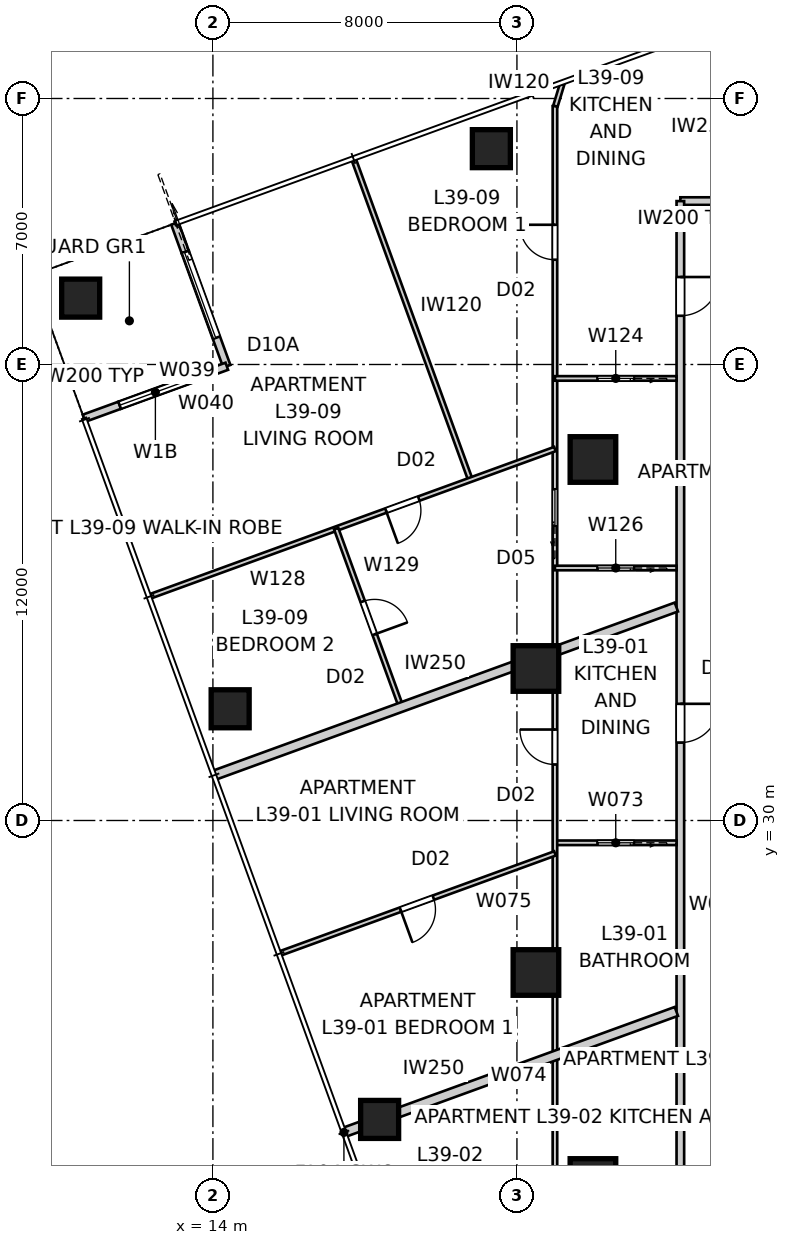
"""IFC4 building model, lengths in metres.
Left out: names, types, materials, properties, quantities, classifications, styles, units other than length and angle.
Written with IfcOpenShell. Run it as: python <this file> out.ifc"""

import sys

from ifc_helpers import new_model, si_unit, direction, frame, frame_2d, origin, origin_2d, place, context, subcontext, project, spatial, rectangle, extrude, element, fill, save


model = new_model("IFC4")
c1 = context("Model", 3, precision=1e-05, world=origin(), true_north=direction((0.0, 1.0)))
c2 = subcontext(c1, "Body", "Model", "MODEL_VIEW")
j1 = project(units=[si_unit("LENGTHUNIT", "METRE"), si_unit("PLANEANGLEUNIT", "RADIAN")], contexts=[c1])
p1 = place(None, origin())
s1 = spatial("IfcSite", under=j1, at=p1, CompositionType="ELEMENT")
p2 = place(p1, origin())
s2 = spatial("IfcBuilding", under=s1, at=p2, CompositionType="ELEMENT")
p3 = place(p2, frame((0.0, 0.0, 143.8)))
s3 = spatial("IfcBuildingStorey", under=s2, at=p3, CompositionType="ELEMENT", Elevation=143.8)
for number, where, z_axis, x_axis in (
    (1, (21.327, 47.68, -0.15), (0.0, 0.0, 1.0), (1.0, 0.0, 0.0)),
    (2, (10.521, 43.747, -0.15), (0.0, 0.0, 1.0), (1.0, 0.0, 0.0)),
    (3, (14.454, 32.94, -0.15), (0.0, 0.0, 1.0), (1.0, 0.0, 0.0)),
    (4, (18.387, 22.134, -0.15), (0.0, 0.0, 1.0), (1.0, 0.0, 0.0)),
):
    element("IfcColumn", number, at=place(p3, frame(where, z_axis=z_axis, x_axis=x_axis)), inside=s3, PredefinedType="COLUMN", context=c2, shape_type="SweptSolid", body=[
        extrude(rectangle(XDim=1.0, YDim=1.0, at=origin_2d()), origin(), (0.0, 0.0, 1.0), 3.55),
    ])
for number, where, z_axis, x_axis in (
    (5, (24.0, 39.5, 0.0), (0.0, 0.0, 1.0), (1.0, 0.0, 0.0)),
    (6, (22.5, 34.0, 0.0), (0.0, 0.0, 1.0), (1.0, 0.0, 0.0)),
    (7, (22.5, 26.0, 0.0), (0.0, 0.0, 1.0), (1.0, 0.0, 0.0)),
    (8, (24.0, 20.5, 0.0), (0.0, 0.0, 1.0), (1.0, 0.0, 0.0)),
):
    element("IfcColumn", number, at=place(p3, frame(where, z_axis=z_axis, x_axis=x_axis)), inside=s3, PredefinedType="COLUMN", context=c2, shape_type="SweptSolid", body=[
        extrude(rectangle(XDim=1.2, YDim=1.2, at=origin_2d()), origin(), (0.0, 0.0, 1.0), 3.4),
    ])
p4 = place(p3, frame((12.998, 45.712, 0.0), z_axis=(0.0, 0.0, 1.0), x_axis=(0.342110593602, -0.939659694648, 0.0)))
e9 = element("IfcWall", 9, at=p4, inside=s3, PredefinedType="SOLIDWALL", context=c2, shape_type="SweptSolid", body=[
    extrude(rectangle(XDim=0.8, YDim=0.2, at=frame_2d((0.4, 0.0))), origin(), (0.0, 0.0, 1.0), 3.25),
])
p5 = place(p3, frame((13.271, 44.96, 0.0), z_axis=(0.0, 0.0, 1.0), x_axis=(0.342018703306, -0.939693144909, 0.0)))
e10 = element("IfcWall", 10, at=p5, inside=s3, PredefinedType="SOLIDWALL", context=c2, shape_type="SweptSolid", body=[
    extrude(rectangle(XDim=3.2, YDim=0.2, at=frame_2d((1.6, 0.0))), origin(), (0.0, 0.0, 1.0), 2.722),
])
p6 = place(p5, origin())
e11 = element("IfcOpeningElement", 11, at=p6, cuts=e10, PredefinedType="OPENING", context=c2, shape_type="SweptSolid", body=[
    extrude(rectangle(XDim=2.4, YDim=2.1, at=frame_2d((1.2, 1.05))), frame((0.0, 0.11, 0.0), z_axis=(0.0, -1.0, 0.0), x_axis=(1.0, 0.0, 0.0)), (0.0, 0.0, 1.0), 0.22),
])
p7 = place(p3, frame((14.366, 41.953, 0.0), z_axis=(0.0, 0.0, 1.0), x_axis=(-0.939712609717, -0.341965219194, 0.0)))
e12 = element("IfcWall", 12, at=p7, inside=s3, PredefinedType="SOLIDWALL", context=c2, shape_type="SweptSolid", body=[
    extrude(rectangle(XDim=3.0, YDim=0.2, at=frame_2d((1.5, 0.0))), origin(), (0.0, 0.0, 1.0), 2.722),
])
p8 = place(p7, frame((1.0, 0.0, 0.45)))
e13 = element("IfcOpeningElement", 13, at=p8, cuts=e12, PredefinedType="OPENING", context=c2, shape_type="SweptSolid", body=[
    extrude(rectangle(XDim=2.0, YDim=1.8, at=frame_2d((1.0, 0.9))), frame((0.0, 0.11, 0.0), z_axis=(0.0, -1.0, 0.0), x_axis=(1.0, 0.0, 0.0)), (0.0, 0.0, 1.0), 0.22),
])
p9 = place(p3, frame((11.547, 40.927, 0.0), z_axis=(0.0, 0.0, 1.0), x_axis=(-0.939686455819, -0.342037080957, 0.0)))
e14 = element("IfcWall", 14, at=p9, inside=s3, PredefinedType="SOLIDWALL", context=c2, shape_type="SweptSolid", body=[
    extrude(rectangle(XDim=1.0, YDim=0.2, at=frame_2d((0.5, 0.0))), origin(), (0.0, 0.0, 1.0), 3.25),
])
p10 = place(p3, frame((30.758, 46.3, 0.0), z_axis=(0.0, 0.0, 1.0), x_axis=(-1.0, 0.0, 0.0)))
e15 = element("IfcWall", 15, at=p10, inside=s3, PredefinedType="PARTITIONING", context=c2, shape_type="SweptSolid", body=[
    extrude(rectangle(XDim=4.458, YDim=0.2, at=frame_2d((2.229, 0.0))), origin(), (0.0, 0.0, 1.0), 3.25),
])
p11 = place(p3, frame((26.3, 46.3, 0.0), z_axis=(0.0, 0.0, 1.0), x_axis=(0.0, -1.0, 0.0)))
e16 = element("IfcWall", 16, at=p11, inside=s3, PredefinedType="PARTITIONING", context=c2, shape_type="SweptSolid", body=[
    extrude(rectangle(XDim=33.0, YDim=0.2, at=frame_2d((16.5, 0.0))), origin(), (0.0, 0.0, 1.0), 3.25),
])
p12 = place(p11, frame((13.229, 0.0, 0.0)))
e17 = element("IfcOpeningElement", 17, at=p12, cuts=e16, PredefinedType="OPENING", context=c2, shape_type="SweptSolid", body=[
    extrude(rectangle(XDim=1.02, YDim=2.34, at=frame_2d((0.51, 1.17))), frame((0.0, 0.11, 0.0), z_axis=(0.0, -1.0, 0.0), x_axis=(1.0, 0.0, 0.0)), (0.0, 0.0, 1.0), 0.22),
])
p13 = place(p11, frame((28.51, 0.0, 0.0)))
e18 = element("IfcOpeningElement", 18, at=p13, cuts=e16, PredefinedType="OPENING", context=c2, shape_type="SweptSolid", body=[
    extrude(rectangle(XDim=1.02, YDim=2.34, at=frame_2d((0.51, 1.17))), frame((0.0, 0.11, 0.0), z_axis=(0.0, -1.0, 0.0), x_axis=(1.0, 0.0, 0.0)), (0.0, 0.0, 1.0), 0.22),
])
p14 = place(p11, frame((1.998, 0.0, 0.0)))
e19 = element("IfcOpeningElement", 19, at=p14, cuts=e16, PredefinedType="OPENING", context=c2, shape_type="SweptSolid", body=[
    extrude(rectangle(XDim=1.02, YDim=2.34, at=frame_2d((0.51, 1.17))), frame((0.0, 0.11, 0.0), z_axis=(0.0, -1.0, 0.0), x_axis=(1.0, 0.0, 0.0)), (0.0, 0.0, 1.0), 0.22),
])
p15 = place(p3, frame((14.027, 31.188, 0.0), z_axis=(0.0, 0.0, 1.0), x_axis=(0.939692090592, 0.342021600019, 0.0)))
e20 = element("IfcWall", 20, at=p15, inside=s3, PredefinedType="PARTITIONING", context=c2, shape_type="SweptSolid", body=[
    extrude(rectangle(XDim=12.949, YDim=0.25, at=frame_2d((6.474, 0.0))), origin(), (0.0, 0.0, 1.0), 3.25),
])
p16 = place(p3, frame((17.447, 21.792, 0.0), z_axis=(0.0, 0.0, 1.0), x_axis=(0.939693071685, 0.342018904489, 0.0)))
e21 = element("IfcWall", 21, at=p16, inside=s3, PredefinedType="PARTITIONING", context=c2, shape_type="SweptSolid", body=[
    extrude(rectangle(XDim=9.309, YDim=0.25, at=frame_2d((4.654, 0.0))), origin(), (0.0, 0.0, 1.0), 3.25),
])
p17 = place(p3, frame((27.093, 50.843, 0.0), z_axis=(0.0, 0.0, 1.0), x_axis=(0.342012883883, -0.939695262975, 0.0)))
e22 = element("IfcWall", 22, at=p17, inside=s3, PredefinedType="PARTITIONING", context=c2, shape_type="SweptSolid", body=[
    extrude(rectangle(XDim=4.722, YDim=0.25, at=frame_2d((2.361, 0.0))), origin(), (0.0, 0.0, 1.0), 3.25),
])
p18 = place(p3, frame((26.2, 29.413, 0.0), z_axis=(0.0, 0.0, 1.0), x_axis=(-1.0, 0.0, 0.0)))
e23 = element("IfcWall", 23, at=p18, inside=s3, PredefinedType="PARTITIONING", context=c2, shape_type="SweptSolid", body=[
    extrude(rectangle(XDim=3.2, YDim=0.12, at=frame_2d((1.6, 0.0))), origin(), (0.0, 0.0, 1.0), 3.25),
])
p19 = place(p18, frame((1.12, 0.0, 0.0)))
e24 = element("IfcOpeningElement", 24, at=p19, cuts=e23, PredefinedType="OPENING", context=c2, shape_type="SweptSolid", body=[
    extrude(rectangle(XDim=0.96, YDim=2.1, at=frame_2d((0.48, 1.05))), frame((0.0, 0.07, 0.0), z_axis=(0.0, -1.0, 0.0), x_axis=(1.0, 0.0, 0.0)), (0.0, 0.0, 1.0), 0.14),
])
p20 = place(p3, frame((23.0, 10.8, 0.0), z_axis=(0.0, 0.0, 1.0), x_axis=(0.0, 1.0, 0.0)))
e25 = element("IfcWall", 25, at=p20, inside=s3, PredefinedType="PARTITIONING", context=c2, shape_type="SweptSolid", body=[
    extrude(rectangle(XDim=38.0, YDim=0.12, at=frame_2d((19.0, 0.0))), origin(), (0.0, 0.0, 1.0), 2.55),
])
p21 = place(p20, frame((20.674, 0.0, 0.0)))
e26 = element("IfcOpeningElement", 26, at=p21, cuts=e25, PredefinedType="OPENING", context=c2, shape_type="SweptSolid", body=[
    extrude(rectangle(XDim=0.92, YDim=2.34, at=frame_2d((0.46, 1.17))), frame((0.0, 0.07, 0.0), z_axis=(0.0, -1.0, 0.0), x_axis=(1.0, 0.0, 0.0)), (0.0, 0.0, 1.0), 0.14),
])
p22 = place(p20, frame((4.598, 0.0, 0.0)))
e27 = element("IfcOpeningElement", 27, at=p22, cuts=e25, PredefinedType="OPENING", context=c2, shape_type="SweptSolid", body=[
    extrude(rectangle(XDim=0.92, YDim=2.34, at=frame_2d((0.46, 1.17))), frame((0.0, 0.07, 0.0), z_axis=(0.0, -1.0, 0.0), x_axis=(1.0, 0.0, 0.0)), (0.0, 0.0, 1.0), 0.14),
])
p23 = place(p20, frame((8.043, 0.0, 0.0)))
e28 = element("IfcOpeningElement", 28, at=p23, cuts=e25, PredefinedType="OPENING", context=c2, shape_type="SweptSolid", body=[
    extrude(rectangle(XDim=0.92, YDim=2.34, at=frame_2d((0.46, 1.17))), frame((0.0, 0.07, 0.0), z_axis=(0.0, -1.0, 0.0), x_axis=(1.0, 0.0, 0.0)), (0.0, 0.0, 1.0), 0.14),
])
p24 = place(p20, frame((33.957, 0.0, 0.0)))
e29 = element("IfcOpeningElement", 29, at=p24, cuts=e25, PredefinedType="OPENING", context=c2, shape_type="SweptSolid", body=[
    extrude(rectangle(XDim=0.92, YDim=2.34, at=frame_2d((0.46, 1.17))), frame((0.0, 0.07, 0.0), z_axis=(0.0, -1.0, 0.0), x_axis=(1.0, 0.0, 0.0)), (0.0, 0.0, 1.0), 0.14),
])
p25 = place(p20, frame((26.957, 0.0, 0.0)))
e30 = element("IfcOpeningElement", 30, at=p25, cuts=e25, PredefinedType="OPENING", context=c2, shape_type="SweptSolid", body=[
    extrude(rectangle(XDim=0.96, YDim=2.1, at=frame_2d((0.48, 1.05))), frame((0.0, 0.07, 0.0), z_axis=(0.0, -1.0, 0.0), x_axis=(1.0, 0.0, 0.0)), (0.0, 0.0, 1.0), 0.14),
])
p26 = place(p3, frame((23.0, 29.134, 0.0), z_axis=(0.0, 0.0, 1.0), x_axis=(-0.939685835373, -0.342038785519, 0.0)))
e31 = element("IfcWall", 31, at=p26, inside=s3, PredefinedType="PARTITIONING", context=c2, shape_type="SweptSolid", body=[
    extrude(rectangle(XDim=7.689, YDim=0.12, at=frame_2d((3.844, 0.0))), origin(), (0.0, 0.0, 1.0), 3.25),
])
p27 = place(p26, frame((3.404, 0.0, 0.0)))
e32 = element("IfcOpeningElement", 32, at=p27, cuts=e31, PredefinedType="OPENING", context=c2, shape_type="SweptSolid", body=[
    extrude(rectangle(XDim=0.92, YDim=2.34, at=frame_2d((0.46, 1.17))), frame((0.0, 0.07, 0.0), z_axis=(0.0, -1.0, 0.0), x_axis=(1.0, 0.0, 0.0)), (0.0, 0.0, 1.0), 0.14),
])
p28 = place(p3, frame((26.2, 41.634, 0.0), z_axis=(0.0, 0.0, 1.0), x_axis=(-1.0, 0.0, 0.0)))
e33 = element("IfcWall", 33, at=p28, inside=s3, PredefinedType="PARTITIONING", context=c2, shape_type="SweptSolid", body=[
    extrude(rectangle(XDim=3.2, YDim=0.12, at=frame_2d((1.6, 0.0))), origin(), (0.0, 0.0, 1.0), 3.25),
])
p29 = place(p28, frame((1.12, 0.0, 0.0)))
e34 = element("IfcOpeningElement", 34, at=p29, cuts=e33, PredefinedType="OPENING", context=c2, shape_type="SweptSolid", body=[
    extrude(rectangle(XDim=0.96, YDim=2.1, at=frame_2d((0.48, 1.05))), frame((0.0, 0.07, 0.0), z_axis=(0.0, -1.0, 0.0), x_axis=(1.0, 0.0, 0.0)), (0.0, 0.0, 1.0), 0.14),
])
p30 = place(p3, frame((23.013, 48.8, 0.0), z_axis=(0.0, 0.0, 1.0), x_axis=(0.290455219909, 0.956888585588, 0.0)))
e35 = element("IfcWall", 35, at=p30, inside=s3, PredefinedType="PARTITIONING", context=c2, shape_type="SweptSolid", body=[
    extrude(rectangle(XDim=0.605, YDim=0.12, at=frame_2d((0.303, 0.0))), origin(), (0.0, 0.0, 1.0), 3.25),
])
p31 = place(p3, frame((26.2, 36.645, 0.0), z_axis=(0.0, 0.0, 1.0), x_axis=(-1.0, 0.0, 0.0)))
e36 = element("IfcWall", 36, at=p31, inside=s3, PredefinedType="PARTITIONING", context=c2, shape_type="SweptSolid", body=[
    extrude(rectangle(XDim=3.2, YDim=0.12, at=frame_2d((1.6, 0.0))), origin(), (0.0, 0.0, 1.0), 3.25),
])
p32 = place(p31, frame((1.12, 0.0, 0.0)))
e37 = element("IfcOpeningElement", 37, at=p32, cuts=e36, PredefinedType="OPENING", context=c2, shape_type="SweptSolid", body=[
    extrude(rectangle(XDim=0.96, YDim=2.1, at=frame_2d((0.48, 1.05))), frame((0.0, 0.07, 0.0), z_axis=(0.0, -1.0, 0.0), x_axis=(1.0, 0.0, 0.0)), (0.0, 0.0, 1.0), 0.14),
])
p33 = place(p3, frame((17.71, 47.385, 0.0), z_axis=(0.0, 0.0, 1.0), x_axis=(0.342038393654, -0.939685978009, 0.0)))
e38 = element("IfcWall", 38, at=p33, inside=s3, PredefinedType="PARTITIONING", context=c2, shape_type="SweptSolid", body=[
    extrude(rectangle(XDim=8.96, YDim=0.12, at=frame_2d((4.48, 0.0))), origin(), (0.0, 0.0, 1.0), 3.25),
])
p34 = place(p3, frame((23.0, 39.775, 0.0), z_axis=(0.0, 0.0, 1.0), x_axis=(-0.939693965364, -0.342016449105, 0.0)))
e39 = element("IfcWall", 39, at=p34, inside=s3, PredefinedType="PARTITIONING", context=c2, shape_type="SweptSolid", body=[
    extrude(rectangle(XDim=11.328, YDim=0.12, at=frame_2d((5.664, 0.0))), origin(), (0.0, 0.0, 1.0), 3.25),
])
p35 = place(p34, frame((3.812, 0.0, 0.0)))
e40 = element("IfcOpeningElement", 40, at=p35, cuts=e39, PredefinedType="OPENING", context=c2, shape_type="SweptSolid", body=[
    extrude(rectangle(XDim=0.92, YDim=2.34, at=frame_2d((0.46, 1.17))), frame((0.0, 0.07, 0.0), z_axis=(0.0, -1.0, 0.0), x_axis=(1.0, 0.0, 0.0)), (0.0, 0.0, 1.0), 0.14),
])
p36 = place(p3, frame((17.243, 37.68, 0.0), z_axis=(0.0, 0.0, 1.0), x_axis=(0.341993964619, -0.939702148643, 0.0)))
e41 = element("IfcWall", 41, at=p36, inside=s3, PredefinedType="PARTITIONING", context=c2, shape_type="SweptSolid", body=[
    extrude(rectangle(XDim=5.0, YDim=0.12, at=frame_2d((2.5, 0.0))), origin(), (0.0, 0.0, 1.0), 3.25),
])
p37 = place(p36, frame((2.04, 0.0, 0.0)))
e42 = element("IfcOpeningElement", 42, at=p37, cuts=e41, PredefinedType="OPENING", context=c2, shape_type="SweptSolid", body=[
    extrude(rectangle(XDim=0.92, YDim=2.34, at=frame_2d((0.46, 1.17))), frame((0.0, 0.07, 0.0), z_axis=(0.0, -1.0, 0.0), x_axis=(1.0, 0.0, 0.0)), (0.0, 0.0, 1.0), 0.14),
])
p38 = place(p6, origin())
e43 = element("IfcDoor", 43, at=p38, inside=s3, OperationType="SLIDING_TO_LEFT", PredefinedType="DOOR", context=c2, shape_type="SweptSolid", body=[
    extrude(rectangle(XDim=2.4, YDim=2.1, at=frame_2d((1.2, 1.05))), frame((0.0, 0.025, 0.0), z_axis=(0.0, -1.0, 0.0), x_axis=(1.0, 0.0, 0.0)), (0.0, 0.0, 1.0), 0.05),
])
fill(e11, e43)
p39 = place(p8, origin())
e44 = element("IfcWindow", 44, at=p39, inside=s3, PartitioningType="SINGLE_PANEL", PredefinedType="WINDOW", context=c2, shape_type="SweptSolid", body=[
    extrude(rectangle(XDim=2.0, YDim=1.8, at=frame_2d((1.0, 0.9))), frame((0.0, 0.03, 0.0), z_axis=(0.0, -1.0, 0.0), x_axis=(1.0, 0.0, 0.0)), (0.0, 0.0, 1.0), 0.06),
])
fill(e13, e44)
p40 = place(p12, origin())
e45 = element("IfcDoor", 45, at=p40, inside=s3, OperationType="SINGLE_SWING_LEFT", PredefinedType="DOOR", context=c2, shape_type="SweptSolid", body=[
    extrude(rectangle(XDim=1.02, YDim=2.34, at=frame_2d((0.51, 1.17))), frame((0.0, 0.025, 0.0), z_axis=(0.0, -1.0, 0.0), x_axis=(1.0, 0.0, 0.0)), (0.0, 0.0, 1.0), 0.05),
])
fill(e17, e45)
p41 = place(p14, origin())
e46 = element("IfcDoor", 46, at=p41, inside=s3, OperationType="SINGLE_SWING_LEFT", PredefinedType="DOOR", context=c2, shape_type="SweptSolid", body=[
    extrude(rectangle(XDim=1.02, YDim=2.34, at=frame_2d((0.51, 1.17))), frame((0.0, 0.025, 0.0), z_axis=(0.0, -1.0, 0.0), x_axis=(1.0, 0.0, 0.0)), (0.0, 0.0, 1.0), 0.05),
])
fill(e19, e46)
p42 = place(p21, origin())
e47 = element("IfcDoor", 47, at=p42, inside=s3, OperationType="SINGLE_SWING_RIGHT", PredefinedType="DOOR", context=c2, shape_type="SweptSolid", body=[
    extrude(rectangle(XDim=0.92, YDim=2.34, at=frame_2d((0.46, 1.17))), frame((0.0, 0.025, 0.0), z_axis=(0.0, -1.0, 0.0), x_axis=(1.0, 0.0, 0.0)), (0.0, 0.0, 1.0), 0.05),
])
fill(e26, e47)
p43 = place(p19, origin())
e48 = element("IfcDoor", 48, at=p43, inside=s3, OperationType="SLIDING_TO_LEFT", PredefinedType="DOOR", context=c2, shape_type="SweptSolid", body=[
    extrude(rectangle(XDim=0.96, YDim=2.1, at=frame_2d((0.48, 1.05))), frame((0.0, 0.025, 0.0), z_axis=(0.0, -1.0, 0.0), x_axis=(1.0, 0.0, 0.0)), (0.0, 0.0, 1.0), 0.05),
])
fill(e24, e48)
p44 = place(p24, origin())
e49 = element("IfcDoor", 49, at=p44, inside=s3, OperationType="SINGLE_SWING_RIGHT", PredefinedType="DOOR", context=c2, shape_type="SweptSolid", body=[
    extrude(rectangle(XDim=0.92, YDim=2.34, at=frame_2d((0.46, 1.17))), frame((0.0, 0.025, 0.0), z_axis=(0.0, -1.0, 0.0), x_axis=(1.0, 0.0, 0.0)), (0.0, 0.0, 1.0), 0.05),
])
fill(e29, e49)
p45 = place(p29, origin())
e50 = element("IfcDoor", 50, at=p45, inside=s3, OperationType="SLIDING_TO_LEFT", PredefinedType="DOOR", context=c2, shape_type="SweptSolid", body=[
    extrude(rectangle(XDim=0.96, YDim=2.1, at=frame_2d((0.48, 1.05))), frame((0.0, 0.025, 0.0), z_axis=(0.0, -1.0, 0.0), x_axis=(1.0, 0.0, 0.0)), (0.0, 0.0, 1.0), 0.05),
])
fill(e34, e50)
p46 = place(p27, origin())
e51 = element("IfcDoor", 51, at=p46, inside=s3, OperationType="SINGLE_SWING_RIGHT", PredefinedType="DOOR", context=c2, shape_type="SweptSolid", body=[
    extrude(rectangle(XDim=0.92, YDim=2.34, at=frame_2d((0.46, 1.17))), frame((0.0, 0.025, 0.0), z_axis=(0.0, -1.0, 0.0), x_axis=(1.0, 0.0, 0.0)), (0.0, 0.0, 1.0), 0.05),
])
fill(e32, e51)
p47 = place(p32, origin())
e52 = element("IfcDoor", 52, at=p47, inside=s3, OperationType="SLIDING_TO_LEFT", PredefinedType="DOOR", context=c2, shape_type="SweptSolid", body=[
    extrude(rectangle(XDim=0.96, YDim=2.1, at=frame_2d((0.48, 1.05))), frame((0.0, 0.025, 0.0), z_axis=(0.0, -1.0, 0.0), x_axis=(1.0, 0.0, 0.0)), (0.0, 0.0, 1.0), 0.05),
])
fill(e37, e52)
p48 = place(p25, origin())
e53 = element("IfcDoor", 53, at=p48, inside=s3, OperationType="SLIDING_TO_LEFT", PredefinedType="DOOR", context=c2, shape_type="SweptSolid", body=[
    extrude(rectangle(XDim=0.96, YDim=2.1, at=frame_2d((0.48, 1.05))), frame((0.0, 0.025, 0.0), z_axis=(0.0, -1.0, 0.0), x_axis=(1.0, 0.0, 0.0)), (0.0, 0.0, 1.0), 0.05),
])
fill(e30, e53)
p49 = place(p37, origin())
e54 = element("IfcDoor", 54, at=p49, inside=s3, OperationType="SINGLE_SWING_RIGHT", PredefinedType="DOOR", context=c2, shape_type="SweptSolid", body=[
    extrude(rectangle(XDim=0.92, YDim=2.34, at=frame_2d((0.46, 1.17))), frame((0.0, 0.025, 0.0), z_axis=(0.0, -1.0, 0.0), x_axis=(1.0, 0.0, 0.0)), (0.0, 0.0, 1.0), 0.05),
])
fill(e42, e54)
p50 = place(p35, origin())
e55 = element("IfcDoor", 55, at=p50, inside=s3, OperationType="SINGLE_SWING_RIGHT", PredefinedType="DOOR", context=c2, shape_type="SweptSolid", body=[
    extrude(rectangle(XDim=0.92, YDim=2.34, at=frame_2d((0.46, 1.17))), frame((0.0, 0.025, 0.0), z_axis=(0.0, -1.0, 0.0), x_axis=(1.0, 0.0, 0.0)), (0.0, 0.0, 1.0), 0.05),
])
fill(e40, e55)
save(model, sys.argv[1])
